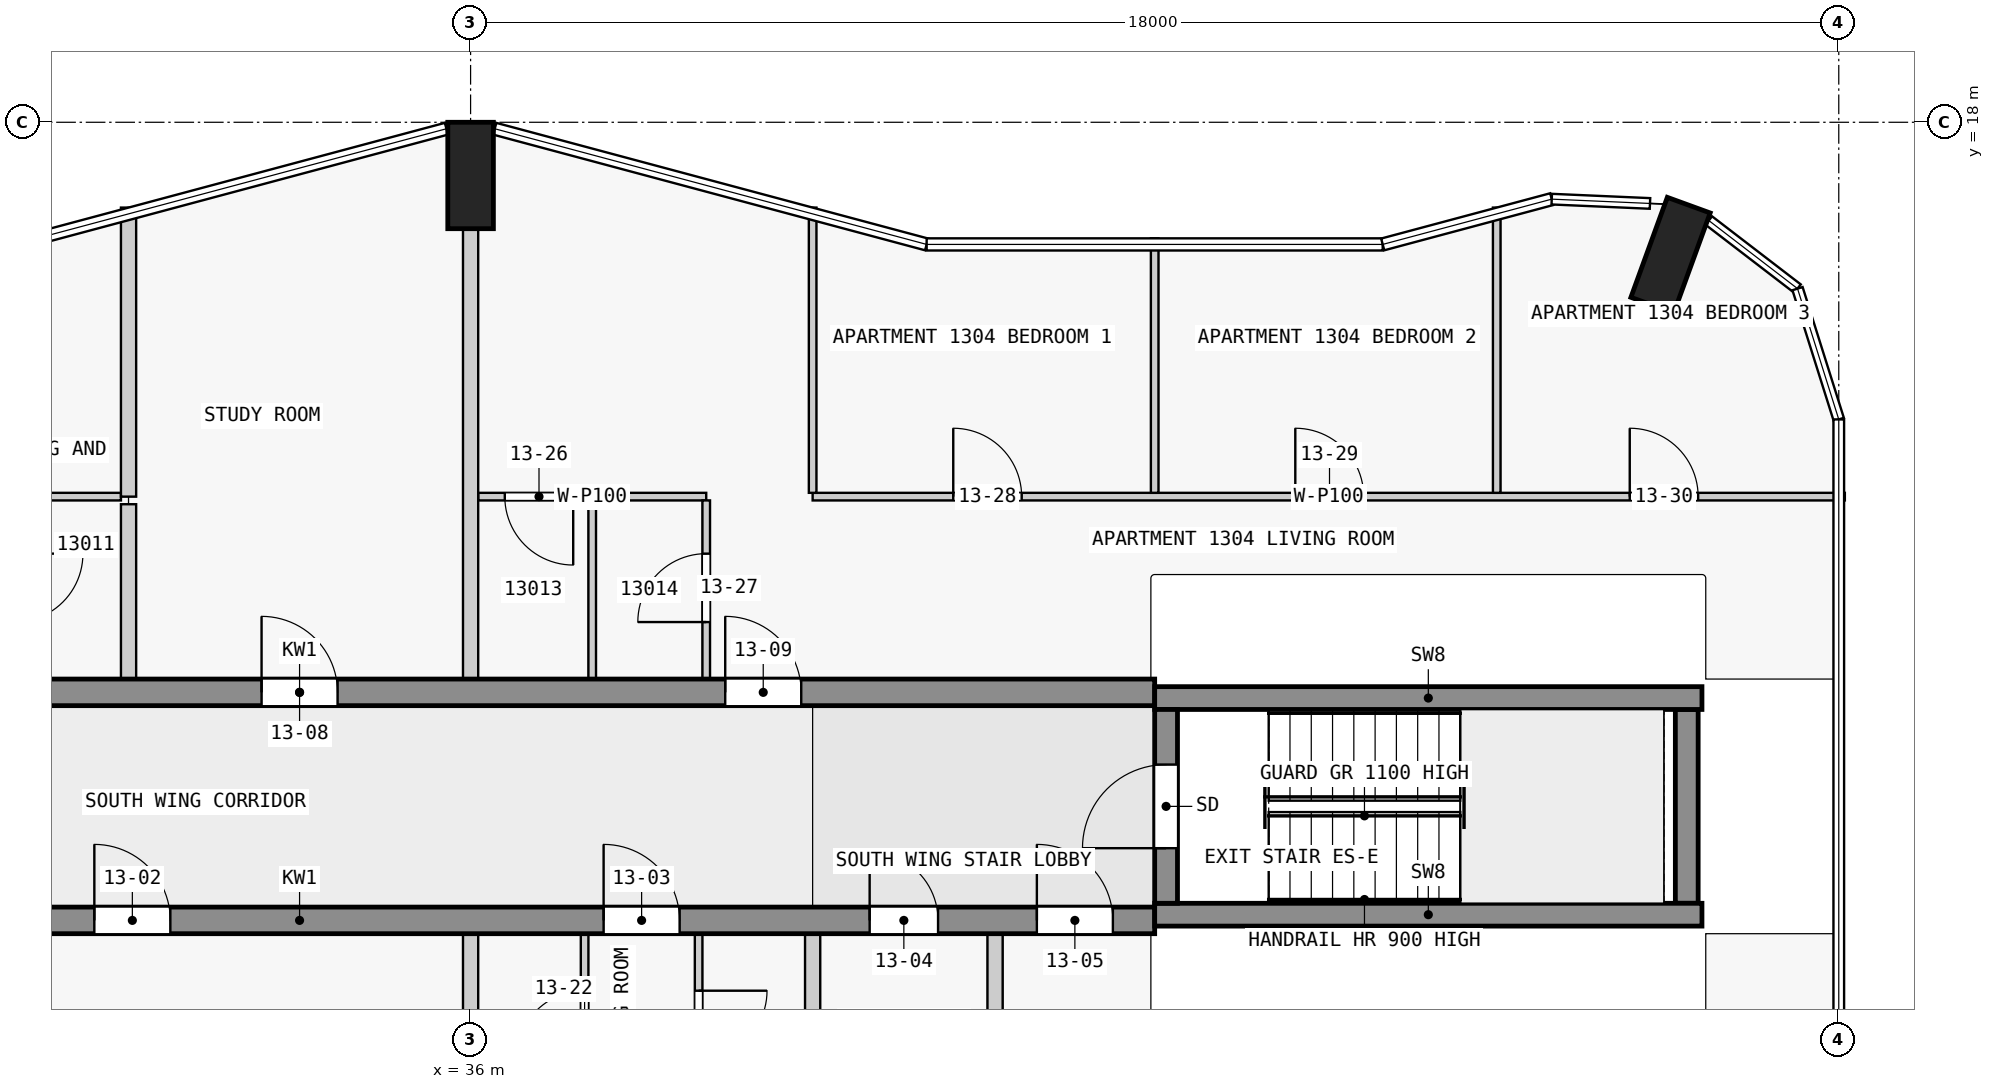
"""IFC4 building model, lengths in metres.
Left out: names, types, materials, properties, quantities, classifications, styles, units other than length and angle.
Written with IfcOpenShell. Run it as: python <this file> out.ifc"""

import sys

from ifc_helpers import new_model, si_unit, direction, frame, frame_2d, origin, origin_2d, place, context, subcontext, project, spatial, rectangle, extrude, element, fill, save


model = new_model("IFC4")
c1 = context("Model", 3, precision=1e-05, world=origin(), true_north=direction((0.0, 1.0)))
c2 = subcontext(c1, "Body", "Model", "MODEL_VIEW")
j1 = project(units=[si_unit("LENGTHUNIT", "METRE"), si_unit("PLANEANGLEUNIT", "RADIAN")], contexts=[c1])
p1 = place(None, origin())
s1 = spatial("IfcSite", under=j1, at=p1, CompositionType="ELEMENT")
p2 = place(p1, origin())
s2 = spatial("IfcBuilding", under=s1, at=p2, CompositionType="ELEMENT")
p3 = place(p2, frame((0.0, 0.0, 54.8)))
s3 = spatial("IfcBuildingStorey", under=s2, at=p3, CompositionType="ELEMENT", Elevation=54.8)
for number, where, z_axis, x_axis in (
    (1, (51.787, 16.252, 0.0), (0.0, 0.0, 1.0), (-0.94, 0.342, 0.0)),
    (2, (36.0, 17.3, 0.0), (0.0, 0.0, 1.0), (1.0, 0.0, 0.0)),
):
    element("IfcColumn", number, at=place(p3, frame(where, z_axis=z_axis, x_axis=x_axis)), inside=s3, PredefinedType="COLUMN", context=c2, shape_type="SweptSolid", body=[
        extrude(rectangle(XDim=0.6, YDim=1.4, at=origin_2d()), origin(), (0.0, 0.0, 1.0), 3.5),
    ])
p4 = place(p3, frame((45.15, 7.725, 0.0), z_axis=(0.0, 0.0, 1.0), x_axis=(0.0, 1.0, 0.0)))
e3 = element("IfcWall", 3, at=p4, inside=s3, PredefinedType="SHEAR", context=c2, shape_type="SweptSolid", body=[
    extrude(rectangle(XDim=2.55, YDim=0.3, at=frame_2d((1.275, 0.0))), origin(), (0.0, 0.0, 1.0), 3.5),
])
p5 = place(p4, frame((0.725, 0.0, 0.0)))
e4 = element("IfcOpeningElement", 4, at=p5, cuts=e3, PredefinedType="OPENING", context=c2, shape_type="SweptSolid", body=[
    extrude(rectangle(XDim=1.1, YDim=2.1, at=frame_2d((0.55, 1.05))), frame((0.0, 0.16, 0.0), z_axis=(0.0, -1.0, 0.0), x_axis=(1.0, 0.0, 0.0)), (0.0, 0.0, 1.0), 0.32),
])
p6 = place(p3, frame((52.0, 7.725, 0.0), z_axis=(0.0, 0.0, 1.0), x_axis=(0.0, 1.0, 0.0)))
e5 = element("IfcWall", 5, at=p6, inside=s3, PredefinedType="SHEAR", context=c2, shape_type="SweptSolid", body=[
    extrude(rectangle(XDim=2.55, YDim=0.3, at=frame_2d((1.275, 0.0))), origin(), (0.0, 0.0, 1.0), 3.5),
])
for number, where, z_axis, x_axis in (
    (6, (45.0, 7.575, 0.0), (0.0, 0.0, 1.0), (1.0, 0.0, 0.0)),
    (7, (45.0, 10.425, 0.0), (0.0, 0.0, 1.0), (1.0, 0.0, 0.0)),
):
    element("IfcWall", number, at=place(p3, frame(where, z_axis=z_axis, x_axis=x_axis)), inside=s3, PredefinedType="SHEAR", context=c2, shape_type="SweptSolid", body=[
        extrude(rectangle(XDim=7.2, YDim=0.3, at=frame_2d((3.6, 0.0))), origin(), (0.0, 0.0, 1.0), 3.5),
    ])
p7 = place(p3, frame((22.5, 7.5, 0.0), z_axis=(0.0, 0.0, 1.0), x_axis=(1.0, 0.0, 0.0)))
e8 = element("IfcWall", 8, at=p7, inside=s3, PredefinedType="SHEAR", context=c2, shape_type="SweptSolid", body=[
    extrude(rectangle(XDim=22.5, YDim=0.35, at=frame_2d((11.25, 0.0))), origin(), (0.0, 0.0, 1.0), 3.25),
])
p8 = place(p7, frame((1.75, 0.0, 0.0)))
e9 = element("IfcOpeningElement", 9, at=p8, cuts=e8, PredefinedType="OPENING", context=c2, shape_type="SweptSolid", body=[
    extrude(rectangle(XDim=1.0, YDim=2.1, at=frame_2d((0.5, 1.05))), frame((0.0, 0.185, 0.0), z_axis=(0.0, -1.0, 0.0), x_axis=(1.0, 0.0, 0.0)), (0.0, 0.0, 1.0), 0.37),
])
p9 = place(p7, frame((8.55, 0.0, 0.0)))
e10 = element("IfcOpeningElement", 10, at=p9, cuts=e8, PredefinedType="OPENING", context=c2, shape_type="SweptSolid", body=[
    extrude(rectangle(XDim=1.0, YDim=2.1, at=frame_2d((0.5, 1.05))), frame((0.0, 0.185, 0.0), z_axis=(0.0, -1.0, 0.0), x_axis=(1.0, 0.0, 0.0)), (0.0, 0.0, 1.0), 0.37),
])
p10 = place(p7, frame((15.25, 0.0, 0.0)))
e11 = element("IfcOpeningElement", 11, at=p10, cuts=e8, PredefinedType="OPENING", context=c2, shape_type="SweptSolid", body=[
    extrude(rectangle(XDim=1.0, YDim=2.1, at=frame_2d((0.5, 1.05))), frame((0.0, 0.185, 0.0), z_axis=(0.0, -1.0, 0.0), x_axis=(1.0, 0.0, 0.0)), (0.0, 0.0, 1.0), 0.37),
])
p11 = place(p7, frame((18.75, 0.0, 0.0)))
e12 = element("IfcOpeningElement", 12, at=p11, cuts=e8, PredefinedType="OPENING", context=c2, shape_type="SweptSolid", body=[
    extrude(rectangle(XDim=0.9, YDim=2.1, at=frame_2d((0.45, 1.05))), frame((0.0, 0.185, 0.0), z_axis=(0.0, -1.0, 0.0), x_axis=(1.0, 0.0, 0.0)), (0.0, 0.0, 1.0), 0.37),
])
p12 = place(p7, frame((20.95, 0.0, 0.0)))
e13 = element("IfcOpeningElement", 13, at=p12, cuts=e8, PredefinedType="OPENING", context=c2, shape_type="SweptSolid", body=[
    extrude(rectangle(XDim=1.0, YDim=2.1, at=frame_2d((0.5, 1.05))), frame((0.0, 0.185, 0.0), z_axis=(0.0, -1.0, 0.0), x_axis=(1.0, 0.0, 0.0)), (0.0, 0.0, 1.0), 0.37),
])
p13 = place(p3, frame((22.5, 10.5, 0.0), z_axis=(0.0, 0.0, 1.0), x_axis=(1.0, 0.0, 0.0)))
e14 = element("IfcWall", 14, at=p13, inside=s3, PredefinedType="SHEAR", context=c2, shape_type="SweptSolid", body=[
    extrude(rectangle(XDim=22.5, YDim=0.35, at=frame_2d((11.25, 0.0))), origin(), (0.0, 0.0, 1.0), 3.25),
])
p14 = place(p13, frame((1.75, 0.0, 0.0)))
e15 = element("IfcOpeningElement", 15, at=p14, cuts=e14, PredefinedType="OPENING", context=c2, shape_type="SweptSolid", body=[
    extrude(rectangle(XDim=1.0, YDim=2.1, at=frame_2d((0.5, 1.05))), frame((0.0, 0.185, 0.0), z_axis=(0.0, -1.0, 0.0), x_axis=(1.0, 0.0, 0.0)), (0.0, 0.0, 1.0), 0.37),
])
p15 = place(p13, frame((6.25, 0.0, 0.0)))
e16 = element("IfcOpeningElement", 16, at=p15, cuts=e14, PredefinedType="OPENING", context=c2, shape_type="SweptSolid", body=[
    extrude(rectangle(XDim=1.0, YDim=2.1, at=frame_2d((0.5, 1.05))), frame((0.0, 0.185, 0.0), z_axis=(0.0, -1.0, 0.0), x_axis=(1.0, 0.0, 0.0)), (0.0, 0.0, 1.0), 0.37),
])
p16 = place(p13, frame((10.75, 0.0, 0.0)))
e17 = element("IfcOpeningElement", 17, at=p16, cuts=e14, PredefinedType="OPENING", context=c2, shape_type="SweptSolid", body=[
    extrude(rectangle(XDim=1.0, YDim=2.1, at=frame_2d((0.5, 1.05))), frame((0.0, 0.185, 0.0), z_axis=(0.0, -1.0, 0.0), x_axis=(1.0, 0.0, 0.0)), (0.0, 0.0, 1.0), 0.37),
])
p17 = place(p13, frame((16.85, 0.0, 0.0)))
e18 = element("IfcOpeningElement", 18, at=p17, cuts=e14, PredefinedType="OPENING", context=c2, shape_type="SweptSolid", body=[
    extrude(rectangle(XDim=1.0, YDim=2.1, at=frame_2d((0.5, 1.05))), frame((0.0, 0.185, 0.0), z_axis=(0.0, -1.0, 0.0), x_axis=(1.0, 0.0, 0.0)), (0.0, 0.0, 1.0), 0.37),
])
p18 = place(p3, frame((31.4, 13.075, 0.0), z_axis=(0.0, 0.0, 1.0), x_axis=(-1.0, 0.0, 0.0)))
e19 = element("IfcWall", 19, at=p18, inside=s3, PredefinedType="PARTITIONING", context=c2, shape_type="SweptSolid", body=[
    extrude(rectangle(XDim=1.35, YDim=0.1, at=frame_2d((0.675, 0.0))), origin(), (0.0, 0.0, 1.0), 3.25),
])
p19 = place(p3, frame((39.1, 13.075, 0.0), z_axis=(0.0, 0.0, 1.0), x_axis=(-1.0, 0.0, 0.0)))
e20 = element("IfcWall", 20, at=p19, inside=s3, PredefinedType="PARTITIONING", context=c2, shape_type="SweptSolid", body=[
    extrude(rectangle(XDim=3.0, YDim=0.1, at=frame_2d((1.5, 0.0))), origin(), (0.0, 0.0, 1.0), 3.25),
])
p20 = place(p19, frame((1.75, 0.0, 0.0)))
e21 = element("IfcOpeningElement", 21, at=p20, cuts=e20, PredefinedType="OPENING", context=c2, shape_type="SweptSolid", body=[
    extrude(rectangle(XDim=0.9, YDim=2.1, at=frame_2d((0.45, 1.05))), frame((0.0, 0.06, 0.0), z_axis=(0.0, -1.0, 0.0), x_axis=(1.0, 0.0, 0.0)), (0.0, 0.0, 1.0), 0.12),
])
p21 = place(p3, frame((40.5, 13.075, 0.0), z_axis=(0.0, 0.0, 1.0), x_axis=(1.0, 0.0, 0.0)))
e22 = element("IfcWall", 22, at=p21, inside=s3, PredefinedType="PARTITIONING", context=c2, shape_type="SweptSolid", body=[
    extrude(rectangle(XDim=13.58, YDim=0.1, at=frame_2d((6.79, 0.0))), origin(), (0.0, 0.0, 1.0), 3.25),
])
p22 = place(p21, frame((1.85, 0.0, 0.0)))
e23 = element("IfcOpeningElement", 23, at=p22, cuts=e22, PredefinedType="OPENING", context=c2, shape_type="SweptSolid", body=[
    extrude(rectangle(XDim=0.9, YDim=2.1, at=frame_2d((0.45, 1.05))), frame((0.0, 0.06, 0.0), z_axis=(0.0, -1.0, 0.0), x_axis=(1.0, 0.0, 0.0)), (0.0, 0.0, 1.0), 0.12),
])
p23 = place(p21, frame((6.35, 0.0, 0.0)))
e24 = element("IfcOpeningElement", 24, at=p23, cuts=e22, PredefinedType="OPENING", context=c2, shape_type="SweptSolid", body=[
    extrude(rectangle(XDim=0.9, YDim=2.1, at=frame_2d((0.45, 1.05))), frame((0.0, 0.06, 0.0), z_axis=(0.0, -1.0, 0.0), x_axis=(1.0, 0.0, 0.0)), (0.0, 0.0, 1.0), 0.12),
])
p24 = place(p21, frame((10.75, 0.0, 0.0)))
e25 = element("IfcOpeningElement", 25, at=p24, cuts=e22, PredefinedType="OPENING", context=c2, shape_type="SweptSolid", body=[
    extrude(rectangle(XDim=0.9, YDim=2.1, at=frame_2d((0.45, 1.05))), frame((0.0, 0.06, 0.0), z_axis=(0.0, -1.0, 0.0), x_axis=(1.0, 0.0, 0.0)), (0.0, 0.0, 1.0), 0.12),
])
p25 = place(p3, frame((31.5, 16.878, 0.0), z_axis=(0.0, 0.0, 1.0), x_axis=(0.0, -1.0, 0.0)))
e26 = element("IfcWall", 26, at=p25, inside=s3, PredefinedType="PARTITIONING", context=c2, shape_type="SweptSolid", body=[
    extrude(rectangle(XDim=3.803, YDim=0.2, at=frame_2d((1.901, 0.0))), origin(), (0.0, 0.0, 1.0), 3.25),
])
p26 = place(p3, frame((31.5, 10.675, 0.0), z_axis=(0.0, 0.0, 1.0), x_axis=(0.0, 1.0, 0.0)))
e27 = element("IfcWall", 27, at=p26, inside=s3, PredefinedType="PARTITIONING", context=c2, shape_type="SweptSolid", body=[
    extrude(rectangle(XDim=2.3, YDim=0.2, at=frame_2d((1.15, 0.0))), origin(), (0.0, 0.0, 1.0), 3.25),
])
for number, where, z_axis, x_axis in (
    (28, (36.0, 1.4, 0.0), (0.0, 0.0, 1.0), (0.0, 1.0, 0.0)),
    (29, (36.0, 10.675, 0.0), (0.0, 0.0, 1.0), (0.0, 1.0, 0.0)),
):
    element("IfcWall", number, at=place(p3, frame(where, z_axis=z_axis, x_axis=x_axis)), inside=s3, PredefinedType="PARTITIONING", context=c2, shape_type="SweptSolid", body=[
        extrude(rectangle(XDim=5.925, YDim=0.2, at=frame_2d((2.962, 0.0))), origin(), (0.0, 0.0, 1.0), 3.25),
    ])
p27 = place(p3, frame((37.5, 4.925, 0.0), z_axis=(0.0, 0.0, 1.0), x_axis=(0.0, 1.0, 0.0)))
e30 = element("IfcWall", 30, at=p27, inside=s3, PredefinedType="PARTITIONING", context=c2, shape_type="SweptSolid", body=[
    extrude(rectangle(XDim=2.4, YDim=0.1, at=frame_2d((1.2, 0.0))), origin(), (0.0, 0.0, 1.0), 3.25),
])
p28 = place(p27, frame((0.75, 0.0, 0.0)))
e31 = element("IfcOpeningElement", 31, at=p28, cuts=e30, PredefinedType="OPENING", context=c2, shape_type="SweptSolid", body=[
    extrude(rectangle(XDim=0.9, YDim=2.1, at=frame_2d((0.45, 1.05))), frame((0.0, 0.06, 0.0), z_axis=(0.0, -1.0, 0.0), x_axis=(1.0, 0.0, 0.0)), (0.0, 0.0, 1.0), 0.12),
])
p29 = place(p3, frame((37.6, 10.675, 0.0), z_axis=(0.0, 0.0, 1.0), x_axis=(0.0, 1.0, 0.0)))
e32 = element("IfcWall", 32, at=p29, inside=s3, PredefinedType="PARTITIONING", context=c2, shape_type="SweptSolid", body=[
    extrude(rectangle(XDim=2.35, YDim=0.1, at=frame_2d((1.175, 0.0))), origin(), (0.0, 0.0, 1.0), 3.25),
])
p30 = place(p3, frame((39.0, 7.325, 0.0), z_axis=(0.0, 0.0, 1.0), x_axis=(0.0, -1.0, 0.0)))
e33 = element("IfcWall", 33, at=p30, inside=s3, PredefinedType="PARTITIONING", context=c2, shape_type="SweptSolid", body=[
    extrude(rectangle(XDim=2.4, YDim=0.1, at=frame_2d((1.2, 0.0))), origin(), (0.0, 0.0, 1.0), 3.25),
])
p31 = place(p30, frame((0.75, 0.0, 0.0)))
e34 = element("IfcOpeningElement", 34, at=p31, cuts=e33, PredefinedType="OPENING", context=c2, shape_type="SweptSolid", body=[
    extrude(rectangle(XDim=0.9, YDim=2.1, at=frame_2d((0.45, 1.05))), frame((0.0, 0.06, 0.0), z_axis=(0.0, -1.0, 0.0), x_axis=(1.0, 0.0, 0.0)), (0.0, 0.0, 1.0), 0.12),
])
p32 = place(p3, frame((39.1, 10.675, 0.0), z_axis=(0.0, 0.0, 1.0), x_axis=(0.0, 1.0, 0.0)))
e35 = element("IfcWall", 35, at=p32, inside=s3, PredefinedType="PARTITIONING", context=c2, shape_type="SweptSolid", body=[
    extrude(rectangle(XDim=2.35, YDim=0.1, at=frame_2d((1.175, 0.0))), origin(), (0.0, 0.0, 1.0), 3.25),
])
p33 = place(p32, frame((0.75, 0.0, 0.0)))
e36 = element("IfcOpeningElement", 36, at=p33, cuts=e35, PredefinedType="OPENING", context=c2, shape_type="SweptSolid", body=[
    extrude(rectangle(XDim=0.9, YDim=2.1, at=frame_2d((0.45, 1.05))), frame((0.0, 0.06, 0.0), z_axis=(0.0, -1.0, 0.0), x_axis=(1.0, 0.0, 0.0)), (0.0, 0.0, 1.0), 0.12),
])
p34 = place(p3, frame((40.5, 16.878, 0.0), z_axis=(0.0, 0.0, 1.0), x_axis=(0.0, -1.0, 0.0)))
e37 = element("IfcWall", 37, at=p34, inside=s3, PredefinedType="PARTITIONING", context=c2, shape_type="SweptSolid", body=[
    extrude(rectangle(XDim=3.753, YDim=0.1, at=frame_2d((1.876, 0.0))), origin(), (0.0, 0.0, 1.0), 3.25),
])
for number, where, z_axis, x_axis in (
    (38, (40.5, 5.025, 0.0), (0.0, 0.0, 1.0), (0.0, 1.0, 0.0)),
    (39, (42.9, 5.025, 0.0), (0.0, 0.0, 1.0), (0.0, 1.0, 0.0)),
):
    element("IfcWall", number, at=place(p3, frame(where, z_axis=z_axis, x_axis=x_axis)), inside=s3, PredefinedType="PARTITIONING", context=c2, shape_type="SweptSolid", body=[
        extrude(rectangle(XDim=2.3, YDim=0.2, at=frame_2d((1.15, 0.0))), origin(), (0.0, 0.0, 1.0), 3.25),
    ])
p35 = place(p3, frame((45.0, 13.125, 0.0), z_axis=(0.0, 0.0, 1.0), x_axis=(0.0, 1.0, 0.0)))
e40 = element("IfcWall", 40, at=p35, inside=s3, PredefinedType="PARTITIONING", context=c2, shape_type="SweptSolid", body=[
    extrude(rectangle(XDim=3.348, YDim=0.1, at=frame_2d((1.674, 0.0))), origin(), (0.0, 0.0, 1.0), 3.25),
])
p36 = place(p3, frame((49.5, 13.125, 0.0), z_axis=(0.0, 0.0, 1.0), x_axis=(0.0, 1.0, 0.0)))
e41 = element("IfcWall", 41, at=p36, inside=s3, PredefinedType="PARTITIONING", context=c2, shape_type="SweptSolid", body=[
    extrude(rectangle(XDim=3.753, YDim=0.1, at=frame_2d((1.876, 0.0))), origin(), (0.0, 0.0, 1.0), 3.25),
])
p37 = place(p5, origin())
e42 = element("IfcDoor", 42, at=p37, inside=s3, OperationType="SINGLE_SWING_LEFT", PredefinedType="DOOR", context=c2, shape_type="SweptSolid", body=[
    extrude(rectangle(XDim=1.1, YDim=2.1, at=frame_2d((0.55, 1.05))), frame((0.0, 0.025, 0.0), z_axis=(0.0, -1.0, 0.0), x_axis=(1.0, 0.0, 0.0)), (0.0, 0.0, 1.0), 0.05),
])
fill(e4, e42)
p38 = place(p9, origin())
e43 = element("IfcDoor", 43, at=p38, inside=s3, OperationType="SINGLE_SWING_LEFT", PredefinedType="DOOR", context=c2, shape_type="SweptSolid", body=[
    extrude(rectangle(XDim=1.0, YDim=2.1, at=frame_2d((0.5, 1.05))), frame((0.0, 0.025, 0.0), z_axis=(0.0, -1.0, 0.0), x_axis=(1.0, 0.0, 0.0)), (0.0, 0.0, 1.0), 0.05),
])
fill(e10, e43)
p39 = place(p10, origin())
e44 = element("IfcDoor", 44, at=p39, inside=s3, OperationType="SINGLE_SWING_RIGHT", PredefinedType="DOOR", context=c2, shape_type="SweptSolid", body=[
    extrude(rectangle(XDim=1.0, YDim=2.1, at=frame_2d((0.5, 1.05))), frame((0.0, 0.025, 0.0), z_axis=(0.0, -1.0, 0.0), x_axis=(1.0, 0.0, 0.0)), (0.0, 0.0, 1.0), 0.05),
])
fill(e11, e44)
p40 = place(p11, origin())
e45 = element("IfcDoor", 45, at=p40, inside=s3, OperationType="SINGLE_SWING_RIGHT", PredefinedType="DOOR", context=c2, shape_type="SweptSolid", body=[
    extrude(rectangle(XDim=0.9, YDim=2.1, at=frame_2d((0.45, 1.05))), frame((0.0, 0.025, 0.0), z_axis=(0.0, -1.0, 0.0), x_axis=(1.0, 0.0, 0.0)), (0.0, 0.0, 1.0), 0.05),
])
fill(e12, e45)
p41 = place(p12, origin())
e46 = element("IfcDoor", 46, at=p41, inside=s3, OperationType="SINGLE_SWING_RIGHT", PredefinedType="DOOR", context=c2, shape_type="SweptSolid", body=[
    extrude(rectangle(XDim=1.0, YDim=2.1, at=frame_2d((0.5, 1.05))), frame((0.0, 0.025, 0.0), z_axis=(0.0, -1.0, 0.0), x_axis=(1.0, 0.0, 0.0)), (0.0, 0.0, 1.0), 0.05),
])
fill(e13, e46)
p42 = place(p16, origin())
e47 = element("IfcDoor", 47, at=p42, inside=s3, OperationType="SINGLE_SWING_LEFT", PredefinedType="DOOR", context=c2, shape_type="SweptSolid", body=[
    extrude(rectangle(XDim=1.0, YDim=2.1, at=frame_2d((0.5, 1.05))), frame((0.0, 0.025, 0.0), z_axis=(0.0, -1.0, 0.0), x_axis=(1.0, 0.0, 0.0)), (0.0, 0.0, 1.0), 0.05),
])
fill(e17, e47)
p43 = place(p17, origin())
e48 = element("IfcDoor", 48, at=p43, inside=s3, OperationType="SINGLE_SWING_RIGHT", PredefinedType="DOOR", context=c2, shape_type="SweptSolid", body=[
    extrude(rectangle(XDim=1.0, YDim=2.1, at=frame_2d((0.5, 1.05))), frame((0.0, 0.025, 0.0), z_axis=(0.0, -1.0, 0.0), x_axis=(1.0, 0.0, 0.0)), (0.0, 0.0, 1.0), 0.05),
])
fill(e18, e48)
p44 = place(p28, origin())
e49 = element("IfcDoor", 49, at=p44, inside=s3, OperationType="SINGLE_SWING_LEFT", PredefinedType="DOOR", context=c2, shape_type="SweptSolid", body=[
    extrude(rectangle(XDim=0.9, YDim=2.1, at=frame_2d((0.45, 1.05))), frame((0.0, 0.025, 0.0), z_axis=(0.0, -1.0, 0.0), x_axis=(1.0, 0.0, 0.0)), (0.0, 0.0, 1.0), 0.05),
])
fill(e31, e49)
p45 = place(p31, origin())
e50 = element("IfcDoor", 50, at=p45, inside=s3, OperationType="SINGLE_SWING_LEFT", PredefinedType="DOOR", context=c2, shape_type="SweptSolid", body=[
    extrude(rectangle(XDim=0.9, YDim=2.1, at=frame_2d((0.45, 1.05))), frame((0.0, 0.025, 0.0), z_axis=(0.0, -1.0, 0.0), x_axis=(1.0, 0.0, 0.0)), (0.0, 0.0, 1.0), 0.05),
])
fill(e34, e50)
p46 = place(p20, origin())
e51 = element("IfcDoor", 51, at=p46, inside=s3, OperationType="SINGLE_SWING_RIGHT", PredefinedType="DOOR", context=c2, shape_type="SweptSolid", body=[
    extrude(rectangle(XDim=0.9, YDim=2.1, at=frame_2d((0.45, 1.05))), frame((0.0, 0.025, 0.0), z_axis=(0.0, -1.0, 0.0), x_axis=(1.0, 0.0, 0.0)), (0.0, 0.0, 1.0), 0.05),
])
fill(e21, e51)
p47 = place(p33, origin())
e52 = element("IfcDoor", 52, at=p47, inside=s3, OperationType="SINGLE_SWING_RIGHT", PredefinedType="DOOR", context=c2, shape_type="SweptSolid", body=[
    extrude(rectangle(XDim=0.9, YDim=2.1, at=frame_2d((0.45, 1.05))), frame((0.0, 0.025, 0.0), z_axis=(0.0, -1.0, 0.0), x_axis=(1.0, 0.0, 0.0)), (0.0, 0.0, 1.0), 0.05),
])
fill(e36, e52)
p48 = place(p22, origin())
e53 = element("IfcDoor", 53, at=p48, inside=s3, OperationType="SINGLE_SWING_LEFT", PredefinedType="DOOR", context=c2, shape_type="SweptSolid", body=[
    extrude(rectangle(XDim=0.9, YDim=2.1, at=frame_2d((0.45, 1.05))), frame((0.0, 0.025, 0.0), z_axis=(0.0, -1.0, 0.0), x_axis=(1.0, 0.0, 0.0)), (0.0, 0.0, 1.0), 0.05),
])
fill(e23, e53)
p49 = place(p23, origin())
e54 = element("IfcDoor", 54, at=p49, inside=s3, OperationType="SINGLE_SWING_RIGHT", PredefinedType="DOOR", context=c2, shape_type="SweptSolid", body=[
    extrude(rectangle(XDim=0.9, YDim=2.1, at=frame_2d((0.45, 1.05))), frame((0.0, 0.025, 0.0), z_axis=(0.0, -1.0, 0.0), x_axis=(1.0, 0.0, 0.0)), (0.0, 0.0, 1.0), 0.05),
])
fill(e24, e54)
p50 = place(p24, origin())
e55 = element("IfcDoor", 55, at=p50, inside=s3, OperationType="SINGLE_SWING_RIGHT", PredefinedType="DOOR", context=c2, shape_type="SweptSolid", body=[
    extrude(rectangle(XDim=0.9, YDim=2.1, at=frame_2d((0.45, 1.05))), frame((0.0, 0.025, 0.0), z_axis=(0.0, -1.0, 0.0), x_axis=(1.0, 0.0, 0.0)), (0.0, 0.0, 1.0), 0.05),
])
fill(e25, e55)
save(model, sys.argv[1])
